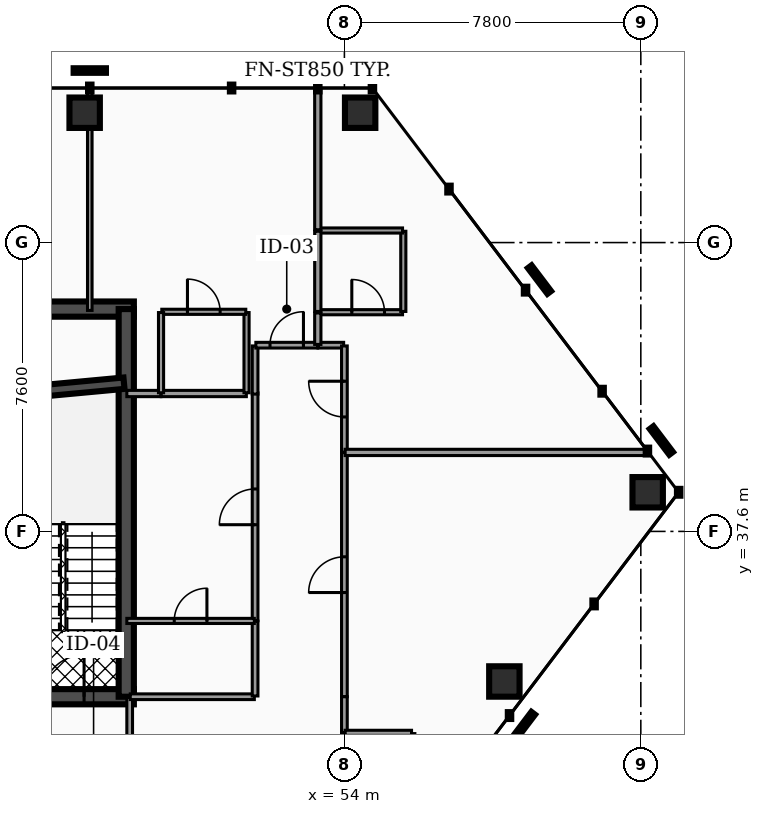
"""IFC4 building model, lengths in metres.
Left out: names, types, materials, properties, quantities, classifications, styles, units other than length and angle.
Written with IfcOpenShell. Run it as: python <this file> out.ifc"""

import sys

from ifc_helpers import new_model, si_unit, direction, frame, frame_2d, origin, origin_2d, place, context, subcontext, project, spatial, rectangle, hollow_rectangle, extrude, element, fill, save


model = new_model("IFC4")
c1 = context("Model", 3, precision=1e-05, world=origin(), true_north=direction((0.0, 1.0)))
c2 = subcontext(c1, "Body", "Model", "MODEL_VIEW")
j1 = project(units=[si_unit("LENGTHUNIT", "METRE"), si_unit("PLANEANGLEUNIT", "RADIAN")], contexts=[c1])
p1 = place(None, origin())
s1 = spatial("IfcSite", under=j1, at=p1, CompositionType="ELEMENT")
p2 = place(p1, origin())
s2 = spatial("IfcBuilding", under=s1, at=p2, CompositionType="ELEMENT")
p3 = place(p2, frame((0.0, 0.0, 127.16)))
s3 = spatial("IfcBuildingStorey", under=s2, at=p3, CompositionType="ELEMENT", Elevation=127.16)
p4 = place(p3, frame((28.4, 43.45, 0.0), z_axis=(0.0, 0.0, 1.0), x_axis=(1.0, 0.0, 0.0)))
e1 = element("IfcWall", 1, at=p4, inside=s3, PredefinedType="SHEAR", context=c2, shape_type="SweptSolid", body=[
    extrude(rectangle(XDim=20.06, YDim=0.4, at=frame_2d((10.03, 0.0))), origin(), (0.0, 0.0, 1.0), 3.5),
])
p5 = place(p3, frame((28.4, 33.25, 0.0), z_axis=(0.0, 0.0, 1.0), x_axis=(1.0, 0.0, 0.0)))
e2 = element("IfcWall", 2, at=p5, inside=s3, PredefinedType="SHEAR", context=c2, shape_type="SweptSolid", body=[
    extrude(rectangle(XDim=20.06, YDim=0.4, at=frame_2d((10.03, 0.0))), origin(), (0.0, 0.0, 1.0), 3.5),
])
p6 = place(p5, frame((4.03, 0.0, 0.0)))
e3 = element("IfcOpeningElement", 3, at=p6, cuts=e2, PredefinedType="OPENING", context=c2, shape_type="SweptSolid", body=[
    extrude(rectangle(XDim=1.1, YDim=2.15, at=frame_2d((0.55, 1.075))), frame((0.0, 0.21, 0.0), z_axis=(0.0, -1.0, 0.0), x_axis=(1.0, 0.0, 0.0)), (0.0, 0.0, 1.0), 0.42),
])
p7 = place(p5, frame((14.87, 0.0, 0.0)))
e4 = element("IfcOpeningElement", 4, at=p7, cuts=e2, PredefinedType="OPENING", context=c2, shape_type="SweptSolid", body=[
    extrude(rectangle(XDim=1.1, YDim=2.15, at=frame_2d((0.55, 1.075))), frame((0.0, 0.21, 0.0), z_axis=(0.0, -1.0, 0.0), x_axis=(1.0, 0.0, 0.0)), (0.0, 0.0, 1.0), 0.42),
])
p8 = place(p5, frame((5.95, 0.0, 0.0)))
e5 = element("IfcOpeningElement", 5, at=p8, cuts=e2, PredefinedType="OPENING", context=c2, shape_type="SweptSolid", body=[
    extrude(rectangle(XDim=1.0, YDim=2.1, at=frame_2d((0.5, 1.05))), frame((0.0, 0.21, 0.0), z_axis=(0.0, -1.0, 0.0), x_axis=(1.0, 0.0, 0.0)), (0.0, 0.0, 1.0), 0.42),
])
p9 = place(p5, frame((7.65, 0.0, 0.0)))
e6 = element("IfcOpeningElement", 6, at=p9, cuts=e2, PredefinedType="OPENING", context=c2, shape_type="SweptSolid", body=[
    extrude(rectangle(XDim=1.0, YDim=2.1, at=frame_2d((0.5, 1.05))), frame((0.0, 0.21, 0.0), z_axis=(0.0, -1.0, 0.0), x_axis=(1.0, 0.0, 0.0)), (0.0, 0.0, 1.0), 0.42),
])
p10 = place(p5, frame((1.31, 0.0, 0.0)))
e7 = element("IfcOpeningElement", 7, at=p10, cuts=e2, PredefinedType="OPENING", context=c2, shape_type="SweptSolid", body=[
    extrude(rectangle(XDim=1.1, YDim=2.2, at=frame_2d((0.55, 1.1))), frame((0.0, 0.21, 0.0), z_axis=(0.0, -1.0, 0.0), x_axis=(1.0, 0.0, 0.0)), (0.0, 0.0, 1.0), 0.42),
])
p11 = place(p5, frame((9.44, 0.0, 0.0)))
e8 = element("IfcOpeningElement", 8, at=p11, cuts=e2, PredefinedType="OPENING", context=c2, shape_type="SweptSolid", body=[
    extrude(rectangle(XDim=1.12, YDim=2.05, at=frame_2d((0.56, 1.025))), frame((0.0, 0.21, 0.0), z_axis=(0.0, -1.0, 0.0), x_axis=(1.0, 0.0, 0.0)), (0.0, 0.0, 1.0), 0.42),
])
p12 = place(p5, frame((17.65, 0.0, 0.0)))
e9 = element("IfcOpeningElement", 9, at=p12, cuts=e2, PredefinedType="OPENING", context=c2, shape_type="SweptSolid", body=[
    extrude(rectangle(XDim=1.1, YDim=2.2, at=frame_2d((0.55, 1.1))), frame((0.0, 0.21, 0.0), z_axis=(0.0, -1.0, 0.0), x_axis=(1.0, 0.0, 0.0)), (0.0, 0.0, 1.0), 0.42),
])
p13 = place(p3, frame((48.26, 33.25, 0.0), z_axis=(0.0, 0.0, 1.0), x_axis=(0.0, 1.0, 0.0)))
e10 = element("IfcWall", 10, at=p13, inside=s3, PredefinedType="SHEAR", context=c2, shape_type="SweptSolid", body=[
    extrude(rectangle(XDim=10.2, YDim=0.4, at=frame_2d((5.1, 0.0))), origin(), (0.0, 0.0, 1.0), 3.5),
])
p14 = place(p3, frame((44.98, 41.2, 0.0), z_axis=(0.0, 0.0, 1.0), x_axis=(0.995686468965, 0.09278176286, 0.0)))
e11 = element("IfcWall", 11, at=p14, inside=s3, PredefinedType="SHEAR", context=c2, shape_type="SweptSolid", body=[
    extrude(rectangle(XDim=3.234, YDim=0.3, at=frame_2d((1.617, 0.0))), origin(), (0.0, 0.0, 1.0), 3.5),
])
for number, where, z_axis, x_axis in (
    (12, (54.415, 48.617, 0.0), (0.0, 0.0, 1.0), (1.0, 0.0, 0.0)),
    (13, (47.165, 48.617, 0.0), (0.0, 0.0, 1.0), (1.0, 0.0, 0.0)),
    (14, (58.209, 33.651, 0.0), (0.0, 0.0, 1.0), (1.0, 0.0, 0.0)),
    (15, (61.981, 38.629, 0.0), (0.0, 0.0, 1.0), (1.0, 0.0, 0.0)),
):
    element("IfcColumn", number, at=place(p3, frame(where, z_axis=z_axis, x_axis=x_axis)), inside=s3, PredefinedType="COLUMN", context=c2, shape_type="SweptSolid", body=[
        extrude(hollow_rectangle(XDim=0.8, YDim=0.8, WallThickness=0.04, at=origin_2d()), origin(), (0.0, 0.0, 1.0), 3.5),
    ])
p15 = place(p3, frame((48.35, 30.17, 0.0), z_axis=(0.0, 0.0, 1.0), x_axis=(0.0, 1.0, 0.0)))
e16 = element("IfcWall", 16, at=p15, inside=s3, PredefinedType="PARTITIONING", context=c2, shape_type="SweptSolid", body=[
    extrude(rectangle(XDim=3.06, YDim=0.15, at=frame_2d((1.53, 0.0))), origin(), (0.0, 0.0, 1.0), 2.457),
])
p16 = place(p15, frame((1.06, 0.0, 0.0)))
e17 = element("IfcOpeningElement", 17, at=p16, cuts=e16, PredefinedType="OPENING", context=c2, shape_type="SweptSolid", body=[
    extrude(rectangle(XDim=0.94, YDim=2.05, at=frame_2d((0.47, 1.025))), frame((0.0, 0.085, 0.0), z_axis=(0.0, -1.0, 0.0), x_axis=(1.0, 0.0, 0.0)), (0.0, 0.0, 1.0), 0.17),
])
p17 = place(p3, frame((54.0, 33.25, 0.0), z_axis=(0.0, 0.0, 1.0), x_axis=(0.0, 1.0, 0.0)))
e18 = element("IfcWall", 18, at=p17, inside=s3, PredefinedType="PARTITIONING", context=c2, shape_type="SweptSolid", body=[
    extrude(rectangle(XDim=6.423, YDim=0.15, at=frame_2d((3.212, 0.0))), origin(), (0.0, 0.0, 1.0), 2.457),
])
p18 = place(p17, frame((2.742, 0.0, 0.0)))
e19 = element("IfcOpeningElement", 19, at=p18, cuts=e18, PredefinedType="OPENING", context=c2, shape_type="SweptSolid", body=[
    extrude(rectangle(XDim=0.94, YDim=2.05, at=frame_2d((0.47, 1.025))), frame((0.0, 0.085, 0.0), z_axis=(0.0, -1.0, 0.0), x_axis=(1.0, 0.0, 0.0)), (0.0, 0.0, 1.0), 0.17),
])
p19 = place(p3, frame((54.0, 32.305, 0.0), z_axis=(0.0, 0.0, 1.0), x_axis=(0.0, 1.0, 0.0)))
e20 = element("IfcWall", 20, at=p19, inside=s3, PredefinedType="PARTITIONING", context=c2, shape_type="SweptSolid", body=[
    extrude(rectangle(XDim=0.945, YDim=0.15, at=frame_2d((0.473, 0.0))), origin(), (0.0, 0.0, 1.0), 2.457),
])
p20 = place(p3, frame((54.0, 30.781, 0.0), z_axis=(0.0, 0.0, 1.0), x_axis=(0.0, 1.0, 0.0)))
e21 = element("IfcWall", 21, at=p20, inside=s3, PredefinedType="PARTITIONING", context=c2, shape_type="SweptSolid", body=[
    extrude(rectangle(XDim=1.514, YDim=0.15, at=frame_2d((0.757, 0.0))), origin(), (0.0, 0.0, 1.0), 2.457),
])
p21 = place(p3, frame((53.305, 42.5, 0.0), z_axis=(0.0, 0.0, 1.0), x_axis=(1.0, 0.0, 0.0)))
e22 = element("IfcWall", 22, at=p21, inside=s3, PredefinedType="PARTITIONING", context=c2, shape_type="SweptSolid", body=[
    extrude(rectangle(XDim=0.675, YDim=0.15, at=frame_2d((0.337, 0.0))), origin(), (0.0, 0.0, 1.0), 2.457),
])
p22 = place(p3, frame((54.0, 39.683, 0.0), z_axis=(0.0, 0.0, 1.0), x_axis=(0.0, 1.0, 0.0)))
e23 = element("IfcWall", 23, at=p22, inside=s3, PredefinedType="PARTITIONING", context=c2, shape_type="SweptSolid", body=[
    extrude(rectangle(XDim=2.797, YDim=0.15, at=frame_2d((1.398, 0.0))), origin(), (0.0, 0.0, 1.0), 2.457),
])
p23 = place(p22, frame((0.928, 0.0, 0.0)))
e24 = element("IfcOpeningElement", 24, at=p23, cuts=e23, PredefinedType="OPENING", context=c2, shape_type="SweptSolid", body=[
    extrude(rectangle(XDim=0.94, YDim=2.05, at=frame_2d((0.47, 1.025))), frame((0.0, 0.085, 0.0), z_axis=(0.0, -1.0, 0.0), x_axis=(1.0, 0.0, 0.0)), (0.0, 0.0, 1.0), 0.17),
])
p24 = place(p3, frame((51.65, 35.25, 0.0), z_axis=(0.0, 0.0, 1.0), x_axis=(0.0, 1.0, 0.0)))
e25 = element("IfcWall", 25, at=p24, inside=s3, PredefinedType="PARTITIONING", context=c2, shape_type="SweptSolid", body=[
    extrude(rectangle(XDim=5.994, YDim=0.15, at=frame_2d((2.997, 0.0))), origin(), (0.0, 0.0, 1.0), 2.457),
])
p25 = place(p24, frame((2.527, 0.0, 0.0)))
e26 = element("IfcOpeningElement", 26, at=p25, cuts=e25, PredefinedType="OPENING", context=c2, shape_type="SweptSolid", body=[
    extrude(rectangle(XDim=0.94, YDim=2.05, at=frame_2d((0.47, 1.025))), frame((0.0, 0.085, 0.0), z_axis=(0.0, -1.0, 0.0), x_axis=(1.0, 0.0, 0.0)), (0.0, 0.0, 1.0), 0.17),
])
p26 = place(p3, frame((48.365, 33.25, 0.0), z_axis=(0.0, 0.0, 1.0), x_axis=(1.0, 0.0, 0.0)))
e27 = element("IfcWall", 27, at=p26, inside=s3, PredefinedType="PARTITIONING", context=c2, shape_type="SweptSolid", body=[
    extrude(rectangle(XDim=3.265, YDim=0.15, at=frame_2d((1.632, 0.0))), origin(), (0.0, 0.0, 1.0), 2.457),
])
p27 = place(p3, frame((51.65, 33.27, 0.0), z_axis=(0.0, 0.0, 1.0), x_axis=(0.0, 1.0, 0.0)))
e28 = element("IfcWall", 28, at=p27, inside=s3, PredefinedType="PARTITIONING", context=c2, shape_type="SweptSolid", body=[
    extrude(rectangle(XDim=1.969, YDim=0.15, at=frame_2d((0.985, 0.0))), origin(), (0.0, 0.0, 1.0), 2.457),
])
p28 = place(p3, frame((51.65, 41.213, 0.0), z_axis=(0.0, 0.0, 1.0), x_axis=(0.0, 1.0, 0.0)))
e29 = element("IfcWall", 29, at=p28, inside=s3, PredefinedType="PARTITIONING", context=c2, shape_type="SweptSolid", body=[
    extrude(rectangle(XDim=1.267, YDim=0.15, at=frame_2d((0.633, 0.0))), origin(), (0.0, 0.0, 1.0), 2.457),
])
p29 = place(p3, frame((51.67, 42.5, 0.0), z_axis=(0.0, 0.0, 1.0), x_axis=(1.0, 0.0, 0.0)))
e30 = element("IfcWall", 30, at=p29, inside=s3, PredefinedType="PARTITIONING", context=c2, shape_type="SweptSolid", body=[
    extrude(rectangle(XDim=1.625, YDim=0.15, at=frame_2d((0.812, 0.0))), origin(), (0.0, 0.0, 1.0), 2.457),
])
p30 = place(p29, frame((0.373, 0.0, 0.0)))
e31 = element("IfcOpeningElement", 31, at=p30, cuts=e30, PredefinedType="OPENING", context=c2, shape_type="SweptSolid", body=[
    extrude(rectangle(XDim=0.88, YDim=2.05, at=frame_2d((0.44, 1.025))), frame((0.0, 0.085, 0.0), z_axis=(0.0, -1.0, 0.0), x_axis=(1.0, 0.0, 0.0)), (0.0, 0.0, 1.0), 0.17),
])
p31 = place(p3, frame((47.3, 43.415, 0.0), z_axis=(0.0, 0.0, 1.0), x_axis=(0.0, 1.0, 0.0)))
e32 = element("IfcWall", 32, at=p31, inside=s3, PredefinedType="PARTITIONING", context=c2, shape_type="SweptSolid", body=[
    extrude(rectangle(XDim=5.837, YDim=0.12, at=frame_2d((2.918, 0.0))), origin(), (0.0, 0.0, 1.0), 2.457),
])
p32 = place(p3, frame((55.787, 30.17, 0.0), z_axis=(0.0, 0.0, 1.0), x_axis=(0.0, 1.0, 0.0)))
e33 = element("IfcWall", 33, at=p32, inside=s3, PredefinedType="PARTITIONING", context=c2, shape_type="SweptSolid", body=[
    extrude(rectangle(XDim=2.11, YDim=0.135, at=frame_2d((1.055, 0.0))), origin(), (0.0, 0.0, 1.0), 2.457),
])
p33 = place(p32, frame((0.625, 0.0, 0.0)))
e34 = element("IfcOpeningElement", 34, at=p33, cuts=e33, PredefinedType="OPENING", context=c2, shape_type="SweptSolid", body=[
    extrude(rectangle(XDim=0.86, YDim=2.05, at=frame_2d((0.43, 1.025))), frame((0.0, 0.077, 0.0), z_axis=(0.0, -1.0, 0.0), x_axis=(1.0, 0.0, 0.0)), (0.0, 0.0, 1.0), 0.155),
])
p34 = place(p3, frame((54.02, 32.3, 0.0), z_axis=(0.0, 0.0, 1.0), x_axis=(1.0, 0.0, 0.0)))
e35 = element("IfcWall", 35, at=p34, inside=s3, PredefinedType="PARTITIONING", context=c2, shape_type="SweptSolid", body=[
    extrude(rectangle(XDim=1.747, YDim=0.135, at=frame_2d((0.874, 0.0))), origin(), (0.0, 0.0, 1.0), 2.457),
])
p35 = place(p3, frame((54.02, 39.678, 0.0), z_axis=(0.0, 0.0, 1.0), x_axis=(1.0, 0.0, 0.0)))
e36 = element("IfcWall", 36, at=p35, inside=s3, PredefinedType="PARTITIONING", context=c2, shape_type="SweptSolid", body=[
    extrude(rectangle(XDim=7.967, YDim=0.165, at=frame_2d((3.983, 0.0))), origin(), (0.0, 0.0, 1.0), 2.457),
])
p36 = place(p3, frame((53.32, 43.367, 0.0), z_axis=(0.0, 0.0, 1.0), x_axis=(1.0, 0.0, 0.0)))
e37 = element("IfcWall", 37, at=p36, inside=s3, PredefinedType="PARTITIONING", context=c2, shape_type="SweptSolid", body=[
    extrude(rectangle(XDim=2.21, YDim=0.135, at=frame_2d((1.105, 0.0))), origin(), (0.0, 0.0, 1.0), 2.457),
])
p37 = place(p36, frame((0.875, 0.0, 0.0)))
e38 = element("IfcOpeningElement", 38, at=p37, cuts=e37, PredefinedType="OPENING", context=c2, shape_type="SweptSolid", body=[
    extrude(rectangle(XDim=0.86, YDim=2.05, at=frame_2d((0.43, 1.025))), frame((0.0, 0.077, 0.0), z_axis=(0.0, -1.0, 0.0), x_axis=(1.0, 0.0, 0.0)), (0.0, 0.0, 1.0), 0.155),
])
p38 = place(p3, frame((55.55, 43.387, 0.0), z_axis=(0.0, 0.0, 1.0), x_axis=(0.0, 1.0, 0.0)))
e39 = element("IfcWall", 39, at=p38, inside=s3, PredefinedType="PARTITIONING", context=c2, shape_type="SweptSolid", body=[
    extrude(rectangle(XDim=2.11, YDim=0.135, at=frame_2d((1.055, 0.0))), origin(), (0.0, 0.0, 1.0), 2.457),
])
p39 = place(p3, frame((53.32, 45.518, 0.0), z_axis=(0.0, 0.0, 1.0), x_axis=(1.0, 0.0, 0.0)))
e40 = element("IfcWall", 40, at=p39, inside=s3, PredefinedType="PARTITIONING", context=c2, shape_type="SweptSolid", body=[
    extrude(rectangle(XDim=2.21, YDim=0.135, at=frame_2d((1.105, 0.0))), origin(), (0.0, 0.0, 1.0), 2.457),
])
p40 = place(p3, frame((53.3, 42.52, 0.0), z_axis=(0.0, 0.0, 1.0), x_axis=(0.0, 1.0, 0.0)))
e41 = element("IfcWall", 41, at=p40, inside=s3, PredefinedType="PARTITIONING", context=c2, shape_type="SweptSolid", body=[
    extrude(rectangle(XDim=0.827, YDim=0.165, at=frame_2d((0.414, 0.0))), origin(), (0.0, 0.0, 1.0), 2.457),
])
p41 = place(p3, frame((53.3, 45.538, 0.0), z_axis=(0.0, 0.0, 1.0), x_axis=(0.0, 1.0, 0.0)))
e42 = element("IfcWall", 42, at=p41, inside=s3, PredefinedType="PARTITIONING", context=c2, shape_type="SweptSolid", body=[
    extrude(rectangle(XDim=3.714, YDim=0.165, at=frame_2d((1.857, 0.0))), origin(), (0.0, 0.0, 1.0), 2.457),
])
p42 = place(p3, frame((53.3, 43.387, 0.0), z_axis=(0.0, 0.0, 1.0), x_axis=(0.0, 1.0, 0.0)))
e43 = element("IfcWall", 43, at=p42, inside=s3, PredefinedType="PARTITIONING", context=c2, shape_type="SweptSolid", body=[
    extrude(rectangle(XDim=2.11, YDim=0.165, at=frame_2d((1.055, 0.0))), origin(), (0.0, 0.0, 1.0), 2.457),
])
p43 = place(p3, frame((48.275, 35.245, 0.0), z_axis=(0.0, 0.0, 1.0), x_axis=(1.0, 0.0, 0.0)))
e44 = element("IfcWall", 44, at=p43, inside=s3, PredefinedType="PARTITIONING", context=c2, shape_type="SweptSolid", body=[
    extrude(rectangle(XDim=3.355, YDim=0.135, at=frame_2d((1.677, 0.0))), origin(), (0.0, 0.0, 1.0), 2.457),
])
p44 = place(p43, frame((1.248, 0.0, 0.0)))
e45 = element("IfcOpeningElement", 45, at=p44, cuts=e44, PredefinedType="OPENING", context=c2, shape_type="SweptSolid", body=[
    extrude(rectangle(XDim=0.86, YDim=2.05, at=frame_2d((0.43, 1.025))), frame((0.0, 0.077, 0.0), z_axis=(0.0, -1.0, 0.0), x_axis=(1.0, 0.0, 0.0)), (0.0, 0.0, 1.0), 0.155),
])
p45 = place(p3, frame((48.275, 41.228, 0.0), z_axis=(0.0, 0.0, 1.0), x_axis=(1.0, 0.0, 0.0)))
e46 = element("IfcWall", 46, at=p45, inside=s3, PredefinedType="PARTITIONING", context=c2, shape_type="SweptSolid", body=[
    extrude(rectangle(XDim=0.895, YDim=0.165, at=frame_2d((0.448, 0.0))), origin(), (0.0, 0.0, 1.0), 2.457),
])
p46 = place(p3, frame((49.18, 41.228, 0.0), z_axis=(0.0, 0.0, 1.0), x_axis=(1.0, 0.0, 0.0)))
e47 = element("IfcWall", 47, at=p46, inside=s3, PredefinedType="PARTITIONING", context=c2, shape_type="SweptSolid", body=[
    extrude(rectangle(XDim=2.24, YDim=0.165, at=frame_2d((1.12, 0.0))), origin(), (0.0, 0.0, 1.0), 2.457),
])
p47 = place(p3, frame((51.425, 41.248, 0.0), z_axis=(0.0, 0.0, 1.0), x_axis=(0.0, 1.0, 0.0)))
e48 = element("IfcWall", 48, at=p47, inside=s3, PredefinedType="PARTITIONING", context=c2, shape_type="SweptSolid", body=[
    extrude(rectangle(XDim=2.11, YDim=0.135, at=frame_2d((1.055, 0.0))), origin(), (0.0, 0.0, 1.0), 2.457),
])
p48 = place(p3, frame((49.195, 43.378, 0.0), z_axis=(0.0, 0.0, 1.0), x_axis=(1.0, 0.0, 0.0)))
e49 = element("IfcWall", 49, at=p48, inside=s3, PredefinedType="PARTITIONING", context=c2, shape_type="SweptSolid", body=[
    extrude(rectangle(XDim=2.21, YDim=0.135, at=frame_2d((1.105, 0.0))), origin(), (0.0, 0.0, 1.0), 2.457),
])
p49 = place(p48, frame((0.675, 0.0, 0.0)))
e50 = element("IfcOpeningElement", 50, at=p49, cuts=e49, PredefinedType="OPENING", context=c2, shape_type="SweptSolid", body=[
    extrude(rectangle(XDim=0.86, YDim=2.05, at=frame_2d((0.43, 1.025))), frame((0.0, 0.077, 0.0), z_axis=(0.0, -1.0, 0.0), x_axis=(1.0, 0.0, 0.0)), (0.0, 0.0, 1.0), 0.155),
])
p50 = place(p3, frame((49.175, 41.248, 0.0), z_axis=(0.0, 0.0, 1.0), x_axis=(0.0, 1.0, 0.0)))
e51 = element("IfcWall", 51, at=p50, inside=s3, PredefinedType="PARTITIONING", context=c2, shape_type="SweptSolid", body=[
    extrude(rectangle(XDim=2.11, YDim=0.135, at=frame_2d((1.055, 0.0))), origin(), (0.0, 0.0, 1.0), 2.457),
])
p51 = place(p12, origin())
e52 = element("IfcDoor", 52, at=p51, inside=s3, OperationType="SINGLE_SWING_RIGHT", PredefinedType="DOOR", context=c2, shape_type="SweptSolid", body=[
    extrude(rectangle(XDim=1.1, YDim=2.2, at=frame_2d((0.55, 1.1))), frame((0.0, 0.025, 0.0), z_axis=(0.0, -1.0, 0.0), x_axis=(1.0, 0.0, 0.0)), (0.0, 0.0, 1.0), 0.05),
])
fill(e9, e52)
p52 = place(p18, origin())
e53 = element("IfcDoor", 53, at=p52, inside=s3, OperationType="SINGLE_SWING_LEFT", PredefinedType="DOOR", context=c2, shape_type="SweptSolid", body=[
    extrude(rectangle(XDim=0.94, YDim=2.05, at=frame_2d((0.47, 1.025))), frame((0.0, 0.025, 0.0), z_axis=(0.0, -1.0, 0.0), x_axis=(1.0, 0.0, 0.0)), (0.0, 0.0, 1.0), 0.05),
])
fill(e19, e53)
p53 = place(p23, origin())
e54 = element("IfcDoor", 54, at=p53, inside=s3, OperationType="SINGLE_SWING_RIGHT", PredefinedType="DOOR", context=c2, shape_type="SweptSolid", body=[
    extrude(rectangle(XDim=0.94, YDim=2.05, at=frame_2d((0.47, 1.025))), frame((0.0, 0.025, 0.0), z_axis=(0.0, -1.0, 0.0), x_axis=(1.0, 0.0, 0.0)), (0.0, 0.0, 1.0), 0.05),
])
fill(e24, e54)
p54 = place(p25, origin())
e55 = element("IfcDoor", 55, at=p54, inside=s3, OperationType="SINGLE_SWING_LEFT", PredefinedType="DOOR", context=c2, shape_type="SweptSolid", body=[
    extrude(rectangle(XDim=0.94, YDim=2.05, at=frame_2d((0.47, 1.025))), frame((0.0, 0.025, 0.0), z_axis=(0.0, -1.0, 0.0), x_axis=(1.0, 0.0, 0.0)), (0.0, 0.0, 1.0), 0.05),
])
fill(e26, e55)
p55 = place(p30, origin())
e56 = element("IfcDoor", 56, at=p55, inside=s3, OperationType="SINGLE_SWING_RIGHT", PredefinedType="DOOR", context=c2, shape_type="SweptSolid", body=[
    extrude(rectangle(XDim=0.88, YDim=2.05, at=frame_2d((0.44, 1.025))), frame((0.0, 0.025, 0.0), z_axis=(0.0, -1.0, 0.0), x_axis=(1.0, 0.0, 0.0)), (0.0, 0.0, 1.0), 0.05),
])
fill(e31, e56)
p56 = place(p37, origin())
e57 = element("IfcDoor", 57, at=p56, inside=s3, OperationType="SINGLE_SWING_LEFT", PredefinedType="DOOR", context=c2, shape_type="SweptSolid", body=[
    extrude(rectangle(XDim=0.86, YDim=2.05, at=frame_2d((0.43, 1.025))), frame((0.0, 0.025, 0.0), z_axis=(0.0, -1.0, 0.0), x_axis=(1.0, 0.0, 0.0)), (0.0, 0.0, 1.0), 0.05),
])
fill(e38, e57)
p57 = place(p44, origin())
e58 = element("IfcDoor", 58, at=p57, inside=s3, OperationType="SINGLE_SWING_RIGHT", PredefinedType="DOOR", context=c2, shape_type="SweptSolid", body=[
    extrude(rectangle(XDim=0.86, YDim=2.05, at=frame_2d((0.43, 1.025))), frame((0.0, 0.025, 0.0), z_axis=(0.0, -1.0, 0.0), x_axis=(1.0, 0.0, 0.0)), (0.0, 0.0, 1.0), 0.05),
])
fill(e45, e58)
p58 = place(p49, origin())
e59 = element("IfcDoor", 59, at=p58, inside=s3, OperationType="SINGLE_SWING_LEFT", PredefinedType="DOOR", context=c2, shape_type="SweptSolid", body=[
    extrude(rectangle(XDim=0.86, YDim=2.05, at=frame_2d((0.43, 1.025))), frame((0.0, 0.025, 0.0), z_axis=(0.0, -1.0, 0.0), x_axis=(1.0, 0.0, 0.0)), (0.0, 0.0, 1.0), 0.05),
])
fill(e50, e59)
save(model, sys.argv[1])
